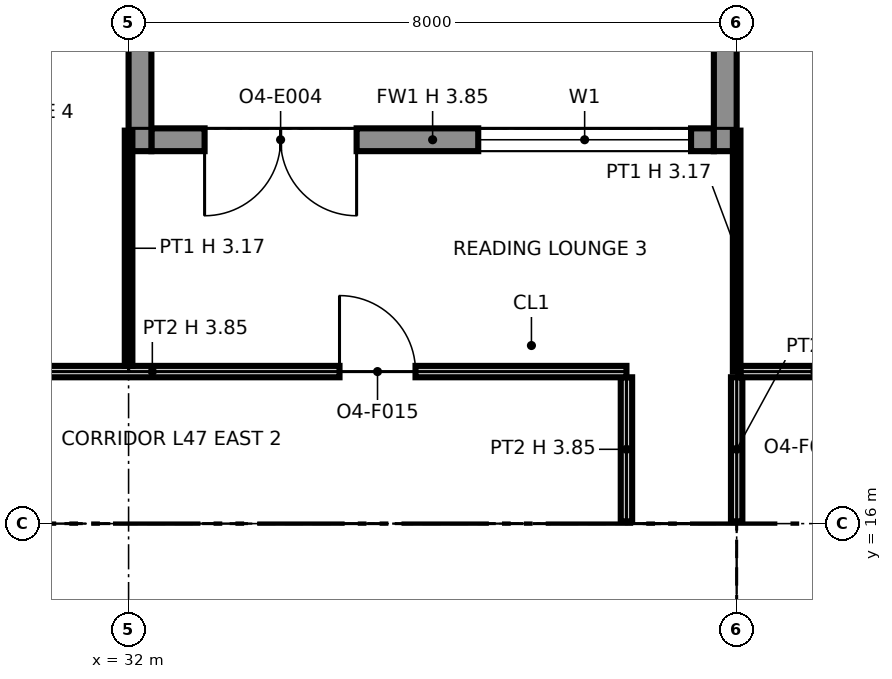
"""IFC4 building model, lengths in metres.
Left out: names, types, materials, properties, quantities, classifications, styles, units other than length and angle.
Written with IfcOpenShell. Run it as: python <this file> out.ifc"""

import sys

from ifc_helpers import new_model, si_unit, direction, frame, frame_2d, origin, origin_2d, place, context, subcontext, project, spatial, polyline, rectangle, i_section, outline, extrude, element, fill, save


model = new_model("IFC4")
c1 = context("Model", 3, precision=1e-05, world=origin(), true_north=direction((0.0, 1.0)))
c2 = subcontext(c1, "Body", "Model", "MODEL_VIEW")
j1 = project(units=[si_unit("LENGTHUNIT", "METRE"), si_unit("PLANEANGLEUNIT", "RADIAN")], contexts=[c1])
p1 = place(None, origin())
s1 = spatial("IfcSite", under=j1, at=p1, CompositionType="ELEMENT")
p2 = place(p1, origin())
s2 = spatial("IfcBuilding", under=s1, at=p2, CompositionType="ELEMENT")
p3 = place(p2, frame((0.0, 0.0, 221.0)))
s3 = spatial("IfcBuildingStorey", under=s2, at=p3, CompositionType="ELEMENT", Elevation=221.0)
for number, where, z_axis, x_axis in (
    (1, (32.0, 16.0, 0.0), (0.0, 0.0, 1.0), (1.0, 0.0, 0.0)),
    (2, (40.0, 16.0, 0.0), (0.0, 0.0, 1.0), (1.0, 0.0, 0.0)),
):
    element("IfcColumn", number, at=place(p3, frame(where, z_axis=z_axis, x_axis=x_axis)), inside=s3, PredefinedType="COLUMN", context=c2, shape_type="SweptSolid", body=[
        extrude(i_section(OverallWidth=0.373, OverallDepth=0.368, WebThickness=0.015, FlangeThickness=0.024, at=origin_2d()), origin(), (0.0, 0.0, 1.0), 3.85),
    ])
p4 = place(p3, frame((39.7, 21.05, 0.0), z_axis=(0.0, 0.0, 1.0), x_axis=(-1.0, 0.0, 0.0)))
e3 = element("IfcWall", 3, at=p4, inside=s3, PredefinedType="SOLIDWALL", context=c2, shape_type="SweptSolid", body=[
    extrude(rectangle(XDim=7.4, YDim=0.3, at=frame_2d((3.7, 0.0))), origin(), (0.0, 0.0, 1.0), 3.85),
])
p5 = place(p4, frame((0.3, 0.0, 0.9)))
e4 = element("IfcOpeningElement", 4, at=p5, cuts=e3, PredefinedType="OPENING", context=c2, shape_type="SweptSolid", body=[
    extrude(rectangle(XDim=2.8, YDim=2.2, at=frame_2d((1.4, 1.1))), frame((0.0, 0.16, 0.0), z_axis=(0.0, -1.0, 0.0), x_axis=(1.0, 0.0, 0.0)), (0.0, 0.0, 1.0), 0.32),
])
p6 = place(p4, frame((4.7, 0.0, 0.0)))
e5 = element("IfcOpeningElement", 5, at=p6, cuts=e3, PredefinedType="OPENING", context=c2, shape_type="SweptSolid", body=[
    extrude(rectangle(XDim=2.0, YDim=2.4, at=frame_2d((1.0, 1.2))), frame((0.0, 0.16, 0.0), z_axis=(0.0, -1.0, 0.0), x_axis=(1.0, 0.0, 0.0)), (0.0, 0.0, 1.0), 0.32),
])
p7 = place(p3, frame((39.85, 23.9, 0.0), z_axis=(0.0, 0.0, 1.0), x_axis=(0.0, -1.0, 0.0)))
e6 = element("IfcWall", 6, at=p7, inside=s3, PredefinedType="SOLIDWALL", context=c2, shape_type="SweptSolid", body=[
    extrude(rectangle(XDim=3.0, YDim=0.3, at=frame_2d((1.5, 0.0))), origin(), (0.0, 0.0, 1.0), 3.171),
])
p8 = place(p3, frame((32.15, 23.9, 0.0), z_axis=(0.0, 0.0, 1.0), x_axis=(0.0, -1.0, 0.0)))
e7 = element("IfcWall", 7, at=p8, inside=s3, PredefinedType="SOLIDWALL", context=c2, shape_type="SweptSolid", body=[
    extrude(rectangle(XDim=3.0, YDim=0.3, at=frame_2d((1.5, 0.0))), origin(), (0.0, 0.0, 1.0), 3.237),
])
p9 = place(p3, frame((24.65, 15.25, 0.0), z_axis=(0.0, 0.0, 1.0), x_axis=(1.0, 0.0, 0.0)))
e8 = element("IfcWall", 8, at=p9, inside=s3, PredefinedType="PARTITIONING", context=c2, shape_type="SweptSolid", body=[
    extrude(outline(polyline([(0.0, 0.0), (14.7, 0.0), (14.7, 3.85), (7.438, 3.85), (7.438, 3.308), (7.262, 3.308), (7.261, 3.85), (0.0, 3.85), (0.0, 0.0)])), frame((0.0, 0.1, 0.0), z_axis=(0.0, -1.0, 0.0), x_axis=(1.0, 0.0, 0.0)), (0.0, 0.0, 1.0), 0.2),
])
p10 = place(p9, frame((2.85, 0.0, 0.0)))
e9 = element("IfcOpeningElement", 9, at=p10, cuts=e8, PredefinedType="OPENING", context=c2, shape_type="SweptSolid", body=[
    extrude(rectangle(XDim=1.8, YDim=2.1, at=frame_2d((0.9, 1.05))), frame((0.0, 0.11, 0.0), z_axis=(0.0, -1.0, 0.0), x_axis=(1.0, 0.0, 0.0)), (0.0, 0.0, 1.0), 0.22),
])
p11 = place(p9, frame((9.95, 0.0, 0.0), z_axis=(0.0, 0.0, 1.0), x_axis=(-1.0, 0.0, 0.0)))
e10 = element("IfcOpeningElement", 10, at=p11, cuts=e8, PredefinedType="OPENING", context=c2, shape_type="SweptSolid", body=[
    extrude(rectangle(XDim=1.4, YDim=2.1, at=frame_2d((0.7, 1.05))), frame((0.0, 0.11, 0.0), z_axis=(0.0, -1.0, 0.0), x_axis=(1.0, 0.0, 0.0)), (0.0, 0.0, 1.0), 0.22),
])
p12 = place(p9, frame((13.4, 0.0, 0.0), z_axis=(0.0, 0.0, 1.0), x_axis=(-1.0, 0.0, 0.0)))
e11 = element("IfcOpeningElement", 11, at=p12, cuts=e8, PredefinedType="OPENING", context=c2, shape_type="SweptSolid", body=[
    extrude(rectangle(XDim=1.4, YDim=2.1, at=frame_2d((0.7, 1.05))), frame((0.0, 0.11, 0.0), z_axis=(0.0, -1.0, 0.0), x_axis=(1.0, 0.0, 0.0)), (0.0, 0.0, 1.0), 0.22),
])
p13 = place(p3, frame((32.0, 13.55, 0.0), z_axis=(0.0, 0.0, 1.0), x_axis=(0.0, 1.0, 0.0)))
e12 = element("IfcWall", 12, at=p13, inside=s3, PredefinedType="PARTITIONING", context=c2, shape_type="SweptSolid", body=[
    extrude(rectangle(XDim=1.6, YDim=0.6, at=frame_2d((0.8, 0.0))), origin(), (0.0, 0.0, 1.0), 3.308),
])
for number, where, z_axis, x_axis in (
    (13, (35.6, 8.85, 0.0), (0.0, 0.0, 1.0), (0.0, 1.0, 0.0)),
    (14, (39.25, 8.85, 0.0), (0.0, 0.0, 1.0), (0.0, 1.0, 0.0)),
):
    element("IfcWall", number, at=place(p3, frame(where, z_axis=z_axis, x_axis=x_axis)), inside=s3, PredefinedType="PARTITIONING", context=c2, shape_type="SweptSolid", body=[
        extrude(rectangle(XDim=6.3, YDim=0.2, at=frame_2d((3.15, 0.0))), origin(), (0.0, 0.0, 1.0), 3.85),
    ])
p14 = place(p3, frame((38.55, 16.03, 0.0), z_axis=(0.0, 0.0, 1.0), x_axis=(0.0, 1.0, 0.0)))
e15 = element("IfcWall", 15, at=p14, inside=s3, PredefinedType="PARTITIONING", context=c2, shape_type="SweptSolid", body=[
    extrude(rectangle(XDim=1.895, YDim=0.15, at=frame_2d((0.948, 0.0))), origin(), (0.0, 0.0, 1.0), 3.85),
])
p15 = place(p3, frame((40.0, 16.03, 0.0), z_axis=(0.0, 0.0, 1.0), x_axis=(0.0, 1.0, 0.0)))
e16 = element("IfcWall", 16, at=p15, inside=s3, PredefinedType="PARTITIONING", context=c2, shape_type="SweptSolid", body=[
    extrude(rectangle(XDim=1.895, YDim=0.15, at=frame_2d((0.948, 0.0))), origin(), (0.0, 0.0, 1.0), 3.172),
])
p16 = place(p3, frame((26.075, 18.0, 0.0), z_axis=(0.0, 0.0, 1.0), x_axis=(1.0, 0.0, 0.0)))
e17 = element("IfcWall", 17, at=p16, inside=s3, PredefinedType="PARTITIONING", context=c2, shape_type="SweptSolid", body=[
    extrude(rectangle(XDim=12.475, YDim=0.15, at=frame_2d((6.238, 0.0))), origin(), (0.0, 0.0, 1.0), 3.85),
])
p17 = place(p16, frame((8.7, 0.0, 0.0)))
e18 = element("IfcOpeningElement", 18, at=p17, cuts=e17, PredefinedType="OPENING", context=c2, shape_type="SweptSolid", body=[
    extrude(rectangle(XDim=1.0, YDim=2.1, at=frame_2d((0.5, 1.05))), frame((0.0, 0.085, 0.0), z_axis=(0.0, -1.0, 0.0), x_axis=(1.0, 0.0, 0.0)), (0.0, 0.0, 1.0), 0.17),
])
p18 = place(p16, frame((3.425, 0.0, 0.0)))
e19 = element("IfcOpeningElement", 19, at=p18, cuts=e17, PredefinedType="OPENING", context=c2, shape_type="SweptSolid", body=[
    extrude(rectangle(XDim=1.0, YDim=2.1, at=frame_2d((0.5, 1.05))), frame((0.0, 0.085, 0.0), z_axis=(0.0, -1.0, 0.0), x_axis=(1.0, 0.0, 0.0)), (0.0, 0.0, 1.0), 0.17),
])
p19 = place(p3, frame((32.0, 18.075, 0.0), z_axis=(0.0, 0.0, 1.0), x_axis=(0.0, 1.0, 0.0)))
e20 = element("IfcWall", 20, at=p19, inside=s3, PredefinedType="PARTITIONING", context=c2, shape_type="SweptSolid", body=[
    extrude(rectangle(XDim=3.095, YDim=0.1, at=frame_2d((1.547, 0.0))), origin(), (0.0, 0.0, 1.0), 3.172),
])
p20 = place(p3, frame((40.05, 18.0, 0.0), z_axis=(0.0, 0.0, 1.0), x_axis=(1.0, 0.0, 0.0)))
e21 = element("IfcWall", 21, at=p20, inside=s3, PredefinedType="PARTITIONING", context=c2, shape_type="SweptSolid", body=[
    extrude(rectangle(XDim=1.95, YDim=0.15, at=frame_2d((0.975, 0.0))), origin(), (0.0, 0.0, 1.0), 3.85),
])
p21 = place(p3, frame((40.0, 18.0, 0.0), z_axis=(0.0, 0.0, 1.0), x_axis=(0.0, 1.0, 0.0)))
e22 = element("IfcWall", 22, at=p21, inside=s3, PredefinedType="PARTITIONING", context=c2, shape_type="SweptSolid", body=[
    extrude(rectangle(XDim=3.17, YDim=0.1, at=frame_2d((1.585, 0.0))), origin(), (0.0, 0.0, 1.0), 3.172),
])
p22 = place(p5, origin())
e23 = element("IfcWindow", 23, at=p22, inside=s3, PartitioningType="SINGLE_PANEL", PredefinedType="WINDOW", context=c2, shape_type="SweptSolid", body=[
    extrude(rectangle(XDim=2.8, YDim=2.2, at=frame_2d((1.4, 1.1))), frame((0.0, 0.03, 0.0), z_axis=(0.0, -1.0, 0.0), x_axis=(1.0, 0.0, 0.0)), (0.0, 0.0, 1.0), 0.06),
])
fill(e4, e23)
p23 = place(p6, origin())
e24 = element("IfcDoor", 24, at=p23, inside=s3, OperationType="DOUBLE_DOOR_SINGLE_SWING", PredefinedType="DOOR", context=c2, shape_type="SweptSolid", body=[
    extrude(rectangle(XDim=2.0, YDim=2.4, at=frame_2d((1.0, 1.2))), frame((0.0, 0.025, 0.0), z_axis=(0.0, -1.0, 0.0), x_axis=(1.0, 0.0, 0.0)), (0.0, 0.0, 1.0), 0.05),
])
fill(e5, e24)
p24 = place(p11, origin())
e25 = element("IfcDoor", 25, at=p24, inside=s3, OperationType="DOUBLE_DOOR_SINGLE_SWING", PredefinedType="NOTDEFINED", context=c2, shape_type="SweptSolid", body=[
    extrude(rectangle(XDim=1.4, YDim=2.1, at=frame_2d((0.7, 1.05))), frame((0.0, 0.025, 0.0), z_axis=(0.0, -1.0, 0.0), x_axis=(1.0, 0.0, 0.0)), (0.0, 0.0, 1.0), 0.05),
])
fill(e10, e25)
p25 = place(p12, origin())
e26 = element("IfcDoor", 26, at=p25, inside=s3, OperationType="DOUBLE_DOOR_SINGLE_SWING", PredefinedType="NOTDEFINED", context=c2, shape_type="SweptSolid", body=[
    extrude(rectangle(XDim=1.4, YDim=2.1, at=frame_2d((0.7, 1.05))), frame((0.0, 0.025, 0.0), z_axis=(0.0, -1.0, 0.0), x_axis=(1.0, 0.0, 0.0)), (0.0, 0.0, 1.0), 0.05),
])
fill(e11, e26)
p26 = place(p17, origin())
e27 = element("IfcDoor", 27, at=p26, inside=s3, OperationType="SINGLE_SWING_LEFT", PredefinedType="DOOR", context=c2, shape_type="SweptSolid", body=[
    extrude(rectangle(XDim=1.0, YDim=2.1, at=frame_2d((0.5, 1.05))), frame((0.0, 0.025, 0.0), z_axis=(0.0, -1.0, 0.0), x_axis=(1.0, 0.0, 0.0)), (0.0, 0.0, 1.0), 0.05),
])
fill(e18, e27)
save(model, sys.argv[1])
